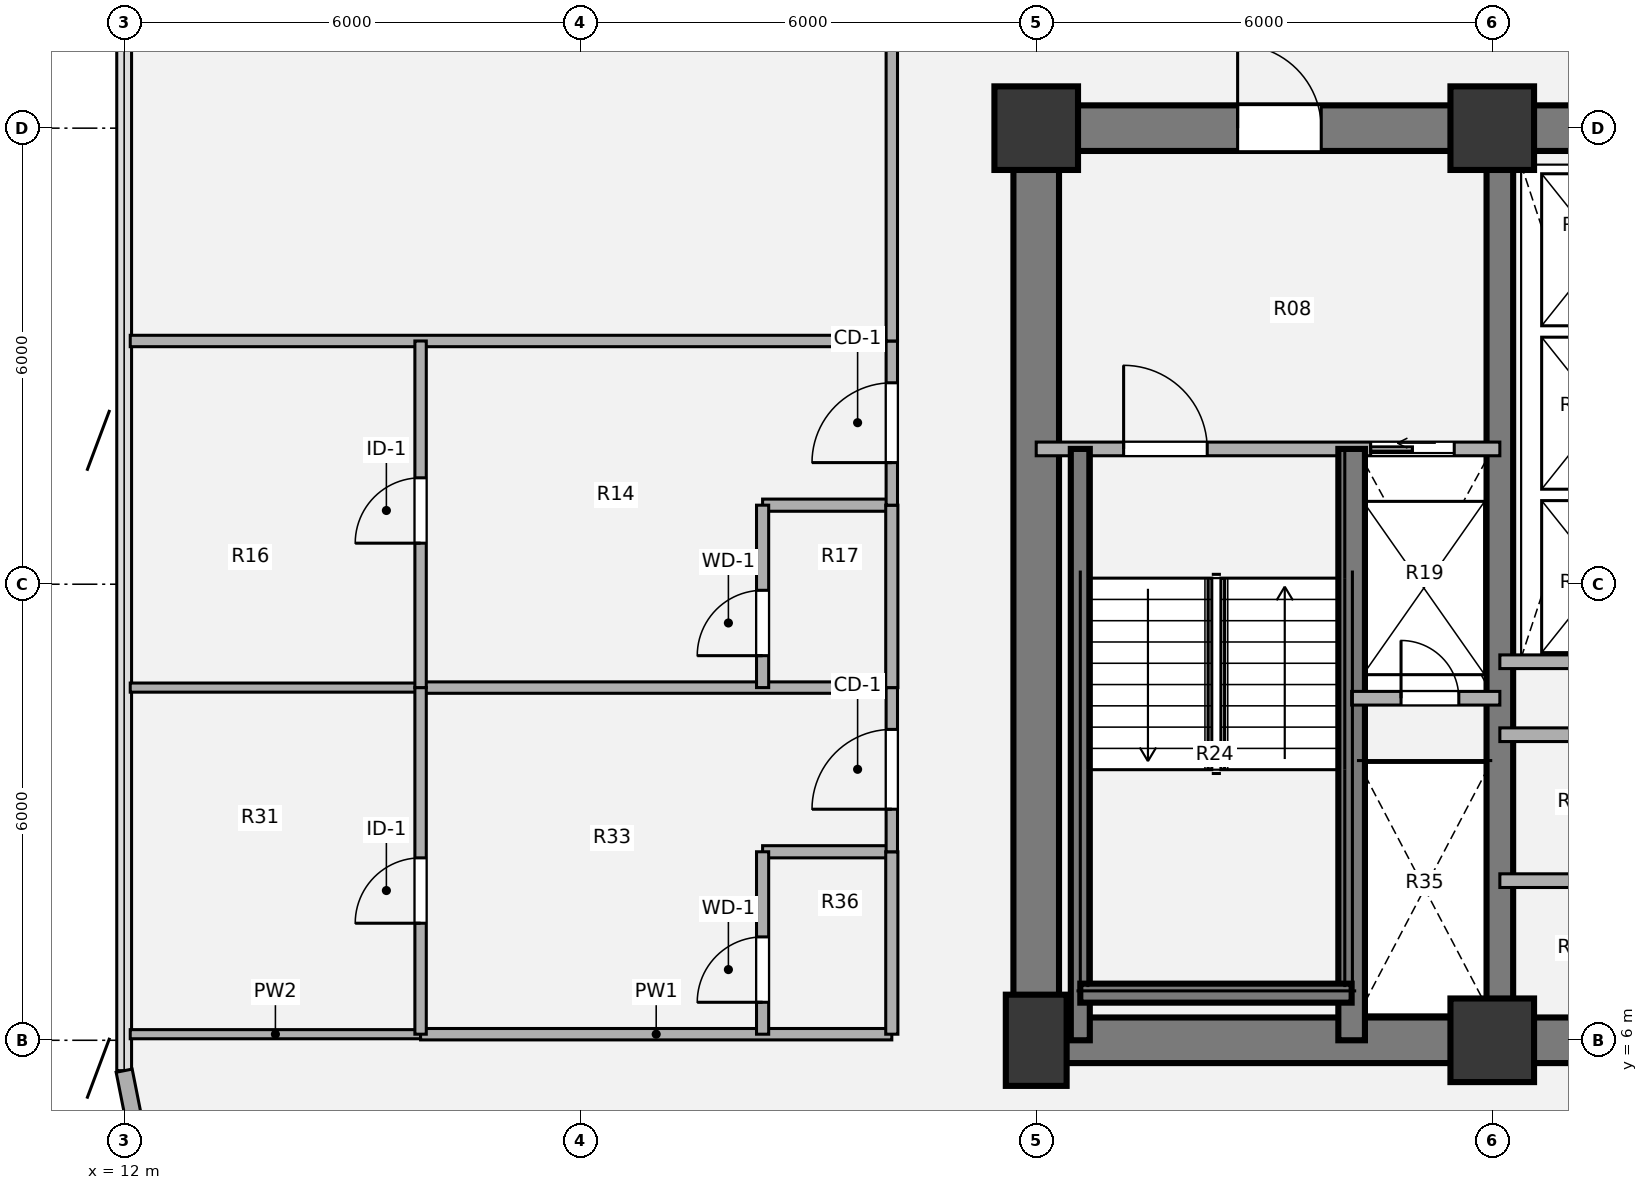
"""IFC4 building model, lengths in metres.
Left out: names, types, materials, properties, quantities, classifications, styles, units other than length and angle.
Written with IfcOpenShell. Run it as: python <this file> out.ifc"""

import sys

from ifc_helpers import new_model, si_unit, direction, frame, frame_2d, origin, origin_2d, place, context, subcontext, project, spatial, rectangle, extrude, source, transform, mapped, element, fill, save


model = new_model("IFC4")
c1 = context("Model", 3, precision=1e-05, world=origin(), true_north=direction((0.0, 1.0)))
c2 = subcontext(c1, "Body", "Model", "MODEL_VIEW")
j1 = project(units=[si_unit("LENGTHUNIT", "METRE"), si_unit("PLANEANGLEUNIT", "RADIAN")], contexts=[c1])
p1 = place(None, origin())
s1 = spatial("IfcSite", under=j1, at=p1, CompositionType="ELEMENT")
p2 = place(p1, origin())
s2 = spatial("IfcBuilding", under=s1, at=p2, CompositionType="ELEMENT")
p3 = place(p2, frame((0.0, 0.0, 45.9)))
s3 = spatial("IfcBuildingStorey", under=s2, at=p3, CompositionType="ELEMENT", Elevation=45.9)
m1 = source(origin(), c2, "Body", "SweptSolid", [
    extrude(rectangle(XDim=0.8, YDim=1.2, at=origin_2d()), origin(), (0.0, 0.0, 1.0), 3.78),
])
p4 = place(p3, frame((24.0, 6.0, 0.0), z_axis=(0.0, 0.0, 1.0), x_axis=(1.0, 0.0, 0.0)))
e1 = element("IfcColumn", 1, at=p4, inside=s3, PredefinedType="COLUMN", context=c2, shape_type="MappedRepresentation", body=[
    mapped(m1, transform((0.0, 0.0, 0.0), x_axis=(1.0, 0.0, 0.0), y_axis=(0.0, 1.0, 0.0), z_axis=(0.0, 0.0, 1.0), scale=1.0)),
])
m2 = source(origin(), c2, "Body", "SweptSolid", [
    extrude(rectangle(XDim=1.1, YDim=1.1, at=origin_2d()), origin(), (0.0, 0.0, 1.0), 3.78),
])
for number, where, z_axis, x_axis in (
    (2, (30.0, 6.0, 0.0), (0.0, 0.0, 1.0), (1.0, 0.0, 0.0)),
    (3, (24.0, 18.0, 0.0), (0.0, 0.0, 1.0), (1.0, 0.0, 0.0)),
    (4, (30.0, 18.0, 0.0), (0.0, 0.0, 1.0), (1.0, 0.0, 0.0)),
):
    element("IfcColumn", number, at=place(p3, frame(where, z_axis=z_axis, x_axis=x_axis)), inside=s3, PredefinedType="COLUMN", context=c2, shape_type="MappedRepresentation", body=[
        mapped(m2, transform((0.0, 0.0, 0.0), x_axis=(1.0, 0.0, 0.0), y_axis=(0.0, 1.0, 0.0), z_axis=(0.0, 0.0, 1.0), scale=1.0)),
    ])
p5 = place(p3, frame((48.3, 6.0, 0.0), z_axis=(0.0, 0.0, 1.0), x_axis=(-1.0, 0.0, 0.0)))
e5 = element("IfcWall", 5, at=p5, inside=s3, PredefinedType="SHEAR", context=c2, shape_type="SweptSolid", body=[
    extrude(rectangle(XDim=24.6, YDim=0.6, at=frame_2d((12.3, 0.0))), origin(), (0.0, 0.0, 1.0), 3.78),
])
p6 = place(p3, frame((24.0, 6.0, 0.0), z_axis=(0.0, 0.0, 1.0), x_axis=(0.0, 1.0, 0.0)))
e6 = element("IfcWall", 6, at=p6, inside=s3, PredefinedType="SHEAR", context=c2, shape_type="SweptSolid", body=[
    extrude(rectangle(XDim=12.0, YDim=0.6, at=frame_2d((6.0, 0.0))), origin(), (0.0, 0.0, 1.0), 3.78),
])
p7 = place(p3, frame((23.7, 18.0, 0.0), z_axis=(0.0, 0.0, 1.0), x_axis=(1.0, 0.0, 0.0)))
e7 = element("IfcWall", 7, at=p7, inside=s3, PredefinedType="SHEAR", context=c2, shape_type="SweptSolid", body=[
    extrude(rectangle(XDim=9.5, YDim=0.6, at=frame_2d((4.75, 0.0))), origin(), (0.0, 0.0, 1.0), 3.78),
])
p8 = place(p7, frame((2.95, 0.0, 0.0)))
e8 = element("IfcOpeningElement", 8, at=p8, cuts=e7, PredefinedType="OPENING", context=c2, shape_type="SweptSolid", body=[
    extrude(rectangle(XDim=1.1, YDim=2.1, at=origin_2d()), frame((0.55, 0.31, 1.05), z_axis=(0.0, -1.0, 0.0), x_axis=(1.0, 0.0, 0.0)), (0.0, 0.0, 1.0), 0.62),
])
p9 = place(p3, frame((30.1, 6.0, 0.0), z_axis=(0.0, 0.0, 1.0), x_axis=(0.0, 1.0, 0.0)))
e9 = element("IfcWall", 9, at=p9, inside=s3, PredefinedType="SHEAR", context=c2, shape_type="SweptSolid", body=[
    extrude(rectangle(XDim=12.0, YDim=0.35, at=frame_2d((6.0, 0.0))), origin(), (0.0, 0.0, 1.0), 3.78),
])
p10 = place(p3, frame((12.244, 4.375, 0.0), z_axis=(0.0, 0.0, 1.0), x_axis=(-0.195138390419, 0.980775717779, 0.0)))
e10 = element("IfcWall", 10, at=p10, inside=s3, PredefinedType="SOLIDWALL", context=c2, shape_type="SweptSolid", body=[
    extrude(rectangle(XDim=1.249, YDim=0.215, at=frame_2d((0.624, 0.0))), origin(), (0.0, 0.0, 1.0), 3.53),
])
for number, where, z_axis, x_axis in (
    (11, (30.1, 10.98, 0.0), (0.0, 0.0, 1.0), (1.0, 0.0, 0.0)),
    (12, (30.1, 8.1, 0.0), (0.0, 0.0, 1.0), (1.0, 0.0, 0.0)),
    (13, (30.1, 10.02, 0.0), (0.0, 0.0, 1.0), (1.0, 0.0, 0.0)),
):
    element("IfcWall", number, at=place(p3, frame(where, z_axis=z_axis, x_axis=x_axis)), inside=s3, PredefinedType="PARTITIONING", context=c2, shape_type="SweptSolid", body=[
        extrude(rectangle(XDim=2.5, YDim=0.18, at=frame_2d((1.25, 0.0))), origin(), (0.0, 0.0, 1.0), 3.5),
    ])
p11 = place(p3, frame((24.0, 13.78, 0.0), z_axis=(0.0, 0.0, 1.0), x_axis=(1.0, 0.0, 0.0)))
e14 = element("IfcWall", 14, at=p11, inside=s3, PredefinedType="PARTITIONING", context=c2, shape_type="SweptSolid", body=[
    extrude(rectangle(XDim=6.1, YDim=0.18, at=frame_2d((3.05, 0.0))), origin(), (0.0, 0.0, 1.0), 3.5),
])
p12 = place(p11, frame((1.15, 0.0, 0.0)))
e15 = element("IfcOpeningElement", 15, at=p12, cuts=e14, PredefinedType="OPENING", context=c2, shape_type="SweptSolid", body=[
    extrude(rectangle(XDim=1.1, YDim=2.1, at=origin_2d()), frame((0.55, 0.1, 1.05), z_axis=(0.0, -1.0, 0.0), x_axis=(1.0, 0.0, 0.0)), (0.0, 0.0, 1.0), 0.2),
])
p13 = place(p11, frame((4.4, 0.0, 0.0)))
e16 = element("IfcOpeningElement", 16, at=p13, cuts=e14, PredefinedType="OPENING", context=c2, shape_type="SweptSolid", body=[
    extrude(rectangle(XDim=1.1, YDim=2.1, at=origin_2d()), frame((0.55, 0.1, 1.05), z_axis=(0.0, -1.0, 0.0), x_axis=(1.0, 0.0, 0.0)), (0.0, 0.0, 1.0), 0.2),
])
p14 = place(p3, frame((28.15, 6.0, 0.0), z_axis=(0.0, 0.0, 1.0), x_axis=(0.0, 1.0, 0.0)))
e17 = element("IfcWall", 17, at=p14, inside=s3, PredefinedType="SHEAR", context=c2, shape_type="SweptSolid", body=[
    extrude(rectangle(XDim=7.78, YDim=0.35, at=frame_2d((3.89, 0.0))), origin(), (0.0, 0.0, 1.0), 3.85),
])
p15 = place(p3, frame((24.58, 6.0, 0.0), z_axis=(0.0, 0.0, 1.0), x_axis=(0.0, 1.0, 0.0)))
e18 = element("IfcWall", 18, at=p15, inside=s3, PredefinedType="SHEAR", context=c2, shape_type="SweptSolid", body=[
    extrude(rectangle(XDim=7.78, YDim=0.25, at=frame_2d((3.89, 0.0))), origin(), (0.0, 0.0, 1.0), 3.85),
])
p16 = place(p3, frame((24.58, 6.62, 0.0), z_axis=(0.0, 0.0, 1.0), x_axis=(1.0, 0.0, 0.0)))
e19 = element("IfcWall", 19, at=p16, inside=s3, PredefinedType="SHEAR", context=c2, shape_type="SweptSolid", body=[
    extrude(rectangle(XDim=3.57, YDim=0.25, at=frame_2d((1.785, 0.0))), origin(), (0.0, 0.0, 1.0), 3.85),
])
p17 = place(p3, frame((28.15, 10.5, 0.0), z_axis=(0.0, 0.0, 1.0), x_axis=(1.0, 0.0, 0.0)))
e20 = element("IfcWall", 20, at=p17, inside=s3, PredefinedType="PARTITIONING", context=c2, shape_type="SweptSolid", body=[
    extrude(rectangle(XDim=1.95, YDim=0.18, at=frame_2d((0.975, 0.0))), origin(), (0.0, 0.0, 1.0), 3.5),
])
p18 = place(p17, frame((0.65, 0.0, 0.0)))
e21 = element("IfcOpeningElement", 21, at=p18, cuts=e20, PredefinedType="OPENING", context=c2, shape_type="SweptSolid", body=[
    extrude(rectangle(XDim=0.76, YDim=2.05, at=origin_2d()), frame((0.38, 0.1, 1.025), z_axis=(0.0, -1.0, 0.0), x_axis=(1.0, 0.0, 0.0)), (0.0, 0.0, 1.0), 0.2),
])
p19 = place(p3, frame((12.08, 6.08, 0.0), z_axis=(0.0, 0.0, 1.0), x_axis=(1.0, 0.0, 0.0)))
e22 = element("IfcWall", 22, at=p19, inside=s3, PredefinedType="PARTITIONING", context=c2, shape_type="SweptSolid", body=[
    extrude(rectangle(XDim=3.82, YDim=0.12, at=frame_2d((1.91, 0.0))), origin(), (0.0, 0.0, 1.0), 3.5),
])
p20 = place(p3, frame((15.9, 6.08, 0.0), z_axis=(0.0, 0.0, 1.0), x_axis=(1.0, 0.0, 0.0)))
e23 = element("IfcWall", 23, at=p20, inside=s3, PredefinedType="PARTITIONING", context=c2, shape_type="SweptSolid", body=[
    extrude(rectangle(XDim=6.2, YDim=0.15, at=frame_2d((3.1, 0.0))), origin(), (0.0, 0.0, 1.0), 3.5),
])
p21 = place(p3, frame((20.4, 8.48, 0.0), z_axis=(0.0, 0.0, 1.0), x_axis=(1.0, 0.0, 0.0)))
e24 = element("IfcWall", 24, at=p21, inside=s3, PredefinedType="PLUMBINGWALL", context=c2, shape_type="SweptSolid", body=[
    extrude(rectangle(XDim=1.7, YDim=0.16, at=frame_2d((0.85, 0.0))), origin(), (0.0, 0.0, 1.0), 3.5),
])
p22 = place(p3, frame((12.08, 10.64, 0.0), z_axis=(0.0, 0.0, 1.0), x_axis=(1.0, 0.0, 0.0)))
e25 = element("IfcWall", 25, at=p22, inside=s3, PredefinedType="PARTITIONING", context=c2, shape_type="SweptSolid", body=[
    extrude(rectangle(XDim=3.82, YDim=0.12, at=frame_2d((1.91, 0.0))), origin(), (0.0, 0.0, 1.0), 3.5),
])
p23 = place(p3, frame((15.9, 10.64, 0.0), z_axis=(0.0, 0.0, 1.0), x_axis=(1.0, 0.0, 0.0)))
e26 = element("IfcWall", 26, at=p23, inside=s3, PredefinedType="PARTITIONING", context=c2, shape_type="SweptSolid", body=[
    extrude(rectangle(XDim=6.2, YDim=0.15, at=frame_2d((3.1, 0.0))), origin(), (0.0, 0.0, 1.0), 3.5),
])
p24 = place(p3, frame((20.4, 13.04, 0.0), z_axis=(0.0, 0.0, 1.0), x_axis=(1.0, 0.0, 0.0)))
e27 = element("IfcWall", 27, at=p24, inside=s3, PredefinedType="PLUMBINGWALL", context=c2, shape_type="SweptSolid", body=[
    extrude(rectangle(XDim=1.7, YDim=0.16, at=frame_2d((0.85, 0.0))), origin(), (0.0, 0.0, 1.0), 3.5),
])
p25 = place(p3, frame((12.08, 15.2, 0.0), z_axis=(0.0, 0.0, 1.0), x_axis=(1.0, 0.0, 0.0)))
e28 = element("IfcWall", 28, at=p25, inside=s3, PredefinedType="PARTITIONING", context=c2, shape_type="SweptSolid", body=[
    extrude(rectangle(XDim=10.02, YDim=0.15, at=frame_2d((5.01, 0.0))), origin(), (0.0, 0.0, 1.0), 3.5),
])
p26 = place(p3, frame((15.9, 6.08, 0.0), z_axis=(0.0, 0.0, 1.0), x_axis=(0.0, 1.0, 0.0)))
e29 = element("IfcWall", 29, at=p26, inside=s3, PredefinedType="PARTITIONING", context=c2, shape_type="SweptSolid", body=[
    extrude(rectangle(XDim=4.56, YDim=0.15, at=frame_2d((2.28, 0.0))), origin(), (0.0, 0.0, 1.0), 3.5),
])
p27 = place(p26, frame((1.46, 0.0, 0.0)))
e30 = element("IfcOpeningElement", 30, at=p27, cuts=e29, PredefinedType="OPENING", context=c2, shape_type="SweptSolid", body=[
    extrude(rectangle(XDim=0.86, YDim=2.1, at=origin_2d()), frame((0.43, 0.085, 1.05), z_axis=(0.0, -1.0, 0.0), x_axis=(1.0, 0.0, 0.0)), (0.0, 0.0, 1.0), 0.17),
])
p28 = place(p3, frame((15.9, 10.64, 0.0), z_axis=(0.0, 0.0, 1.0), x_axis=(0.0, 1.0, 0.0)))
e31 = element("IfcWall", 31, at=p28, inside=s3, PredefinedType="PARTITIONING", context=c2, shape_type="SweptSolid", body=[
    extrude(rectangle(XDim=4.56, YDim=0.15, at=frame_2d((2.28, 0.0))), origin(), (0.0, 0.0, 1.0), 3.5),
])
p29 = place(p28, frame((1.9, 0.0, 0.0)))
e32 = element("IfcOpeningElement", 32, at=p29, cuts=e31, PredefinedType="OPENING", context=c2, shape_type="SweptSolid", body=[
    extrude(rectangle(XDim=0.86, YDim=2.1, at=origin_2d()), frame((0.43, 0.085, 1.05), z_axis=(0.0, -1.0, 0.0), x_axis=(1.0, 0.0, 0.0)), (0.0, 0.0, 1.0), 0.17),
])
p30 = place(p3, frame((20.4, 6.08, 0.0), z_axis=(0.0, 0.0, 1.0), x_axis=(0.0, 1.0, 0.0)))
e33 = element("IfcWall", 33, at=p30, inside=s3, PredefinedType="PLUMBINGWALL", context=c2, shape_type="SweptSolid", body=[
    extrude(rectangle(XDim=2.4, YDim=0.16, at=frame_2d((1.2, 0.0))), origin(), (0.0, 0.0, 1.0), 3.5),
])
p31 = place(p30, frame((0.42, 0.0, 0.0)))
e34 = element("IfcOpeningElement", 34, at=p31, cuts=e33, PredefinedType="OPENING", context=c2, shape_type="SweptSolid", body=[
    extrude(rectangle(XDim=0.86, YDim=2.1, at=origin_2d()), frame((0.43, 0.09, 1.05), z_axis=(0.0, -1.0, 0.0), x_axis=(1.0, 0.0, 0.0)), (0.0, 0.0, 1.0), 0.18),
])
p32 = place(p3, frame((20.4, 10.64, 0.0), z_axis=(0.0, 0.0, 1.0), x_axis=(0.0, 1.0, 0.0)))
e35 = element("IfcWall", 35, at=p32, inside=s3, PredefinedType="PLUMBINGWALL", context=c2, shape_type="SweptSolid", body=[
    extrude(rectangle(XDim=2.4, YDim=0.16, at=frame_2d((1.2, 0.0))), origin(), (0.0, 0.0, 1.0), 3.5),
])
p33 = place(p32, frame((0.42, 0.0, 0.0)))
e36 = element("IfcOpeningElement", 36, at=p33, cuts=e35, PredefinedType="OPENING", context=c2, shape_type="SweptSolid", body=[
    extrude(rectangle(XDim=0.86, YDim=2.1, at=origin_2d()), frame((0.43, 0.09, 1.05), z_axis=(0.0, -1.0, 0.0), x_axis=(1.0, 0.0, 0.0)), (0.0, 0.0, 1.0), 0.18),
])
p34 = place(p3, frame((22.1, 6.08, 0.0), z_axis=(0.0, 0.0, 1.0), x_axis=(0.0, 1.0, 0.0)))
e37 = element("IfcWall", 37, at=p34, inside=s3, PredefinedType="PLUMBINGWALL", context=c2, shape_type="SweptSolid", body=[
    extrude(rectangle(XDim=2.4, YDim=0.16, at=frame_2d((1.2, 0.0))), origin(), (0.0, 0.0, 1.0), 3.5),
])
p35 = place(p3, frame((22.1, 8.48, 0.0), z_axis=(0.0, 0.0, 1.0), x_axis=(0.0, 1.0, 0.0)))
e38 = element("IfcWall", 38, at=p35, inside=s3, PredefinedType="PARTITIONING", context=c2, shape_type="SweptSolid", body=[
    extrude(rectangle(XDim=2.16, YDim=0.15, at=frame_2d((1.08, 0.0))), origin(), (0.0, 0.0, 1.0), 3.5),
])
p36 = place(p35, frame((0.56, 0.0, 0.0)))
e39 = element("IfcOpeningElement", 39, at=p36, cuts=e38, PredefinedType="OPENING", context=c2, shape_type="SweptSolid", body=[
    extrude(rectangle(XDim=1.05, YDim=2.1, at=origin_2d()), frame((0.525, 0.085, 1.05), z_axis=(0.0, -1.0, 0.0), x_axis=(1.0, 0.0, 0.0)), (0.0, 0.0, 1.0), 0.17),
])
p37 = place(p3, frame((22.1, 10.64, 0.0), z_axis=(0.0, 0.0, 1.0), x_axis=(0.0, 1.0, 0.0)))
e40 = element("IfcWall", 40, at=p37, inside=s3, PredefinedType="PLUMBINGWALL", context=c2, shape_type="SweptSolid", body=[
    extrude(rectangle(XDim=2.4, YDim=0.16, at=frame_2d((1.2, 0.0))), origin(), (0.0, 0.0, 1.0), 3.5),
])
p38 = place(p3, frame((22.1, 13.04, 0.0), z_axis=(0.0, 0.0, 1.0), x_axis=(0.0, 1.0, 0.0)))
e41 = element("IfcWall", 41, at=p38, inside=s3, PredefinedType="PARTITIONING", context=c2, shape_type="SweptSolid", body=[
    extrude(rectangle(XDim=2.16, YDim=0.15, at=frame_2d((1.08, 0.0))), origin(), (0.0, 0.0, 1.0), 3.5),
])
p39 = place(p38, frame((0.56, 0.0, 0.0)))
e42 = element("IfcOpeningElement", 42, at=p39, cuts=e41, PredefinedType="OPENING", context=c2, shape_type="SweptSolid", body=[
    extrude(rectangle(XDim=1.05, YDim=2.1, at=origin_2d()), frame((0.525, 0.085, 1.05), z_axis=(0.0, -1.0, 0.0), x_axis=(1.0, 0.0, 0.0)), (0.0, 0.0, 1.0), 0.17),
])
p40 = place(p3, frame((22.1, 15.2, 0.0), z_axis=(0.0, 0.0, 1.0), x_axis=(0.0, 1.0, 0.0)))
e43 = element("IfcWall", 43, at=p40, inside=s3, PredefinedType="PARTITIONING", context=c2, shape_type="SweptSolid", body=[
    extrude(rectangle(XDim=9.8, YDim=0.15, at=frame_2d((4.9, 0.0))), origin(), (0.0, 0.0, 1.0), 3.5),
])
p41 = place(p40, frame((4.375, 0.0, 0.0)))
e44 = element("IfcOpeningElement", 44, at=p41, cuts=e43, PredefinedType="OPENING", context=c2, shape_type="SweptSolid", body=[
    extrude(rectangle(XDim=1.05, YDim=2.1, at=origin_2d()), frame((0.525, 0.085, 1.05), z_axis=(0.0, -1.0, 0.0), x_axis=(1.0, 0.0, 0.0)), (0.0, 0.0, 1.0), 0.17),
])
m3 = source(origin(), c2, "Body", "SweptSolid", [
    extrude(rectangle(XDim=1.1, YDim=2.1, at=origin_2d()), frame((0.55, 0.025, 1.05), z_axis=(0.0, -1.0, 0.0), x_axis=(1.0, 0.0, 0.0)), (0.0, 0.0, 1.0), 0.05),
])
p42 = place(p12, origin())
e45 = element("IfcDoor", 45, at=p42, inside=s3, OperationType="SINGLE_SWING_LEFT", PredefinedType="DOOR", context=c2, shape_type="MappedRepresentation", body=[
    mapped(m3, transform((0.0, 0.0, 0.0), x_axis=(1.0, 0.0, 0.0), y_axis=(0.0, 1.0, 0.0), z_axis=(0.0, 0.0, 1.0), scale=1.0)),
])
fill(e15, e45)
m4 = source(origin(), c2, "Body", "SweptSolid", [
    extrude(rectangle(XDim=1.1, YDim=2.1, at=origin_2d()), frame((0.55, 0.025, 1.05), z_axis=(0.0, -1.0, 0.0), x_axis=(1.0, 0.0, 0.0)), (0.0, 0.0, 1.0), 0.05),
])
p43 = place(p13, origin())
e46 = element("IfcDoor", 46, at=p43, inside=s3, OperationType="SLIDING_TO_LEFT", PredefinedType="DOOR", context=c2, shape_type="MappedRepresentation", body=[
    mapped(m4, transform((0.0, 0.0, 0.0), x_axis=(1.0, 0.0, 0.0), y_axis=(0.0, 1.0, 0.0), z_axis=(0.0, 0.0, 1.0), scale=1.0)),
])
fill(e16, e46)
m5 = source(origin(), c2, "Body", "SweptSolid", [
    extrude(rectangle(XDim=0.76, YDim=2.05, at=origin_2d()), frame((0.38, 0.025, 1.025), z_axis=(0.0, -1.0, 0.0), x_axis=(1.0, 0.0, 0.0)), (0.0, 0.0, 1.0), 0.05),
])
p44 = place(p18, origin())
e47 = element("IfcDoor", 47, at=p44, inside=s3, OperationType="SINGLE_SWING_LEFT", PredefinedType="DOOR", context=c2, shape_type="MappedRepresentation", body=[
    mapped(m5, transform((0.0, 0.0, 0.0), x_axis=(1.0, 0.0, 0.0), y_axis=(0.0, 1.0, 0.0), z_axis=(0.0, 0.0, 1.0), scale=1.0)),
])
fill(e21, e47)
m6 = source(origin(), c2, "Body", "SweptSolid", [
    extrude(rectangle(XDim=1.1, YDim=2.1, at=origin_2d()), frame((0.55, 0.025, 1.05), z_axis=(0.0, -1.0, 0.0), x_axis=(1.0, 0.0, 0.0)), (0.0, 0.0, 1.0), 0.05),
])
p45 = place(p8, origin())
e48 = element("IfcDoor", 48, at=p45, inside=s3, OperationType="SINGLE_SWING_LEFT", PredefinedType="DOOR", context=c2, shape_type="MappedRepresentation", body=[
    mapped(m6, transform((0.0, 0.0, 0.0), x_axis=(1.0, 0.0, 0.0), y_axis=(0.0, 1.0, 0.0), z_axis=(0.0, 0.0, 1.0), scale=1.0)),
])
fill(e8, e48)
m7 = source(origin(), c2, "Body", "SweptSolid", [
    extrude(rectangle(XDim=0.86, YDim=2.1, at=origin_2d()), frame((0.43, 0.025, 1.05), z_axis=(0.0, -1.0, 0.0), x_axis=(1.0, 0.0, 0.0)), (0.0, 0.0, 1.0), 0.05),
])
p46 = place(p27, origin())
e49 = element("IfcDoor", 49, at=p46, inside=s3, OperationType="SINGLE_SWING_LEFT", PredefinedType="DOOR", context=c2, shape_type="MappedRepresentation", body=[
    mapped(m7, transform((0.0, 0.0, 0.0), x_axis=(1.0, 0.0, 0.0), y_axis=(0.0, 1.0, 0.0), z_axis=(0.0, 0.0, 1.0), scale=1.0)),
])
fill(e30, e49)
p47 = place(p29, origin())
e50 = element("IfcDoor", 50, at=p47, inside=s3, OperationType="SINGLE_SWING_LEFT", PredefinedType="DOOR", context=c2, shape_type="MappedRepresentation", body=[
    mapped(m7, transform((0.0, 0.0, 0.0), x_axis=(1.0, 0.0, 0.0), y_axis=(0.0, 1.0, 0.0), z_axis=(0.0, 0.0, 1.0), scale=1.0)),
])
fill(e32, e50)
m8 = source(origin(), c2, "Body", "SweptSolid", [
    extrude(rectangle(XDim=0.86, YDim=2.1, at=origin_2d()), frame((0.43, 0.025, 1.05), z_axis=(0.0, -1.0, 0.0), x_axis=(1.0, 0.0, 0.0)), (0.0, 0.0, 1.0), 0.05),
])
p48 = place(p31, origin())
e51 = element("IfcDoor", 51, at=p48, inside=s3, OperationType="SINGLE_SWING_LEFT", PredefinedType="DOOR", context=c2, shape_type="MappedRepresentation", body=[
    mapped(m8, transform((0.0, 0.0, 0.0), x_axis=(1.0, 0.0, 0.0), y_axis=(0.0, 1.0, 0.0), z_axis=(0.0, 0.0, 1.0), scale=1.0)),
])
fill(e34, e51)
p49 = place(p33, origin())
e52 = element("IfcDoor", 52, at=p49, inside=s3, OperationType="SINGLE_SWING_LEFT", PredefinedType="DOOR", context=c2, shape_type="MappedRepresentation", body=[
    mapped(m8, transform((0.0, 0.0, 0.0), x_axis=(1.0, 0.0, 0.0), y_axis=(0.0, 1.0, 0.0), z_axis=(0.0, 0.0, 1.0), scale=1.0)),
])
fill(e36, e52)
m9 = source(origin(), c2, "Body", "SweptSolid", [
    extrude(rectangle(XDim=1.05, YDim=2.1, at=origin_2d()), frame((0.525, 0.025, 1.05), z_axis=(0.0, -1.0, 0.0), x_axis=(1.0, 0.0, 0.0)), (0.0, 0.0, 1.0), 0.05),
])
p50 = place(p36, origin())
e53 = element("IfcDoor", 53, at=p50, inside=s3, OperationType="SINGLE_SWING_LEFT", PredefinedType="DOOR", context=c2, shape_type="MappedRepresentation", body=[
    mapped(m9, transform((0.0, 0.0, 0.0), x_axis=(1.0, 0.0, 0.0), y_axis=(0.0, 1.0, 0.0), z_axis=(0.0, 0.0, 1.0), scale=1.0)),
])
fill(e39, e53)
p51 = place(p39, origin())
e54 = element("IfcDoor", 54, at=p51, inside=s3, OperationType="SINGLE_SWING_LEFT", PredefinedType="DOOR", context=c2, shape_type="MappedRepresentation", body=[
    mapped(m9, transform((0.0, 0.0, 0.0), x_axis=(1.0, 0.0, 0.0), y_axis=(0.0, 1.0, 0.0), z_axis=(0.0, 0.0, 1.0), scale=1.0)),
])
fill(e42, e54)
save(model, sys.argv[1])
